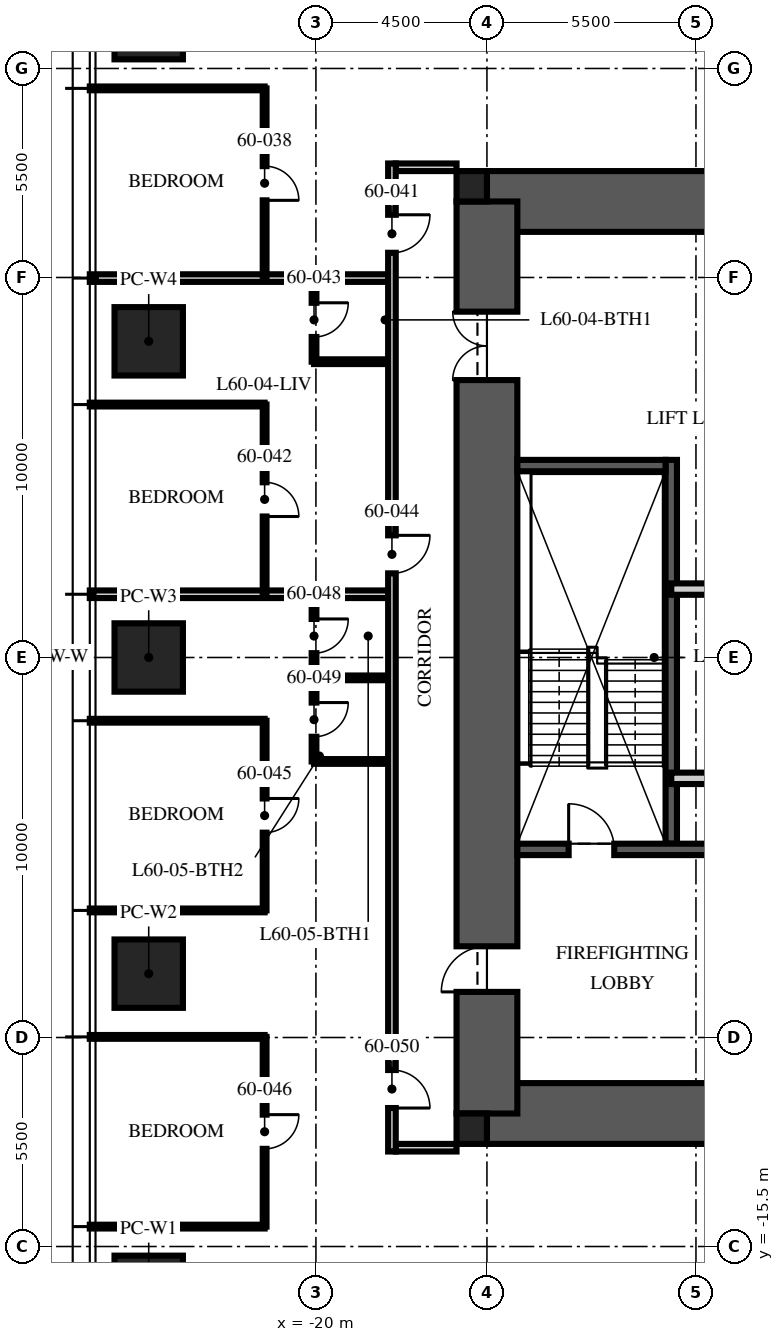
"""IFC4 building model, lengths in metres.
Left out: names, types, materials, properties, quantities, classifications, styles, units other than length and angle.
Written with IfcOpenShell. Run it as: python <this file> out.ifc"""

import sys

from ifc_helpers import new_model, si_unit, direction, frame, frame_2d, origin, origin_2d, place, context, subcontext, project, spatial, rectangle, extrude, element, fill, save


model = new_model("IFC4")
c1 = context("Model", 3, precision=1e-05, world=origin(), true_north=direction((0.0, 1.0)))
c2 = subcontext(c1, "Body", "Model", "MODEL_VIEW")
j1 = project(units=[si_unit("LENGTHUNIT", "METRE"), si_unit("PLANEANGLEUNIT", "RADIAN")], contexts=[c1])
p1 = place(None, origin())
s1 = spatial("IfcSite", under=j1, at=p1, CompositionType="ELEMENT")
p2 = place(p1, origin())
s2 = spatial("IfcBuilding", under=s1, at=p2, CompositionType="ELEMENT")
p3 = place(p2, frame((0.0, 0.0, 240.75)))
s3 = spatial("IfcBuildingStorey", under=s2, at=p3, CompositionType="ELEMENT", Elevation=240.75)
for number, where, z_axis, x_axis in (
    (1, (-15.5, 12.0, -0.25), (0.0, 0.0, 1.0), (1.0, 0.0, 0.0)),
    (2, (-15.5, -12.0, -0.25), (0.0, 0.0, 1.0), (1.0, 0.0, 0.0)),
):
    element("IfcWall", number, at=place(p3, frame(where, z_axis=z_axis, x_axis=x_axis)), inside=s3, PredefinedType="SHEAR", context=c2, shape_type="SweptSolid", body=[
        extrude(rectangle(XDim=31.0, YDim=1.6, at=frame_2d((15.5, 0.0))), origin(), (0.0, 0.0, 1.0), 3.75),
    ])
p4 = place(p3, frame((-15.5, -12.0, -0.25), z_axis=(0.0, 0.0, 1.0), x_axis=(0.0, 1.0, 0.0)))
e3 = element("IfcWall", 3, at=p4, inside=s3, PredefinedType="SHEAR", context=c2, shape_type="SweptSolid", body=[
    extrude(rectangle(XDim=24.0, YDim=1.6, at=frame_2d((12.0, 0.0))), origin(), (0.0, 0.0, 1.0), 3.75),
])
p5 = place(p4, frame((3.2, 0.0, 0.25)))
e4 = element("IfcOpeningElement", 4, at=p5, cuts=e3, PredefinedType="OPENING", context=c2, shape_type="SweptSolid", body=[
    extrude(rectangle(XDim=1.2, YDim=2.1, at=frame_2d((0.6, 1.05))), frame((0.0, 0.81, 0.0), z_axis=(0.0, -1.0, 0.0), x_axis=(1.0, 0.0, 0.0)), (0.0, 0.0, 1.0), 1.62),
])
p6 = place(p4, frame((19.3, 0.0, 0.25)))
e5 = element("IfcOpeningElement", 5, at=p6, cuts=e3, PredefinedType="OPENING", context=c2, shape_type="SweptSolid", body=[
    extrude(rectangle(XDim=1.8, YDim=2.1, at=frame_2d((0.9, 1.05))), frame((0.0, 0.81, 0.0), z_axis=(0.0, -1.0, 0.0), x_axis=(1.0, 0.0, 0.0)), (0.0, 0.0, 1.0), 1.62),
])
for number, where, z_axis, x_axis in (
    (6, (-15.9, 12.4, -0.25), (0.0, 0.0, 1.0), (1.0, 0.0, 0.0)),
    (7, (-15.9, -12.4, -0.25), (0.0, 0.0, 1.0), (1.0, 0.0, 0.0)),
):
    element("IfcColumn", number, at=place(p3, frame(where, z_axis=z_axis, x_axis=x_axis)), inside=s3, PredefinedType="COLUMN", context=c2, shape_type="SweptSolid", body=[
        extrude(rectangle(XDim=0.8, YDim=0.8, at=origin_2d()), origin(), (0.0, 0.0, 1.0), 3.75),
    ])
for number, where, z_axis, x_axis in (
    (8, (-24.4, -16.64, 0.0), (0.0, 0.0, 1.0), (0.0, 1.0, 0.0)),
    (9, (-24.4, -8.32, 0.0), (0.0, 0.0, 1.0), (0.0, 1.0, 0.0)),
    (10, (-24.4, 0.0, 0.0), (0.0, 0.0, 1.0), (0.0, 1.0, 0.0)),
    (11, (-24.4, 8.32, 0.0), (0.0, 0.0, 1.0), (0.0, 1.0, 0.0)),
    (12, (-24.4, 16.64, 0.0), (0.0, 0.0, 1.0), (0.0, 1.0, 0.0)),
):
    element("IfcColumn", number, at=place(p3, frame(where, z_axis=z_axis, x_axis=x_axis)), inside=s3, PredefinedType="COLUMN", context=c2, shape_type="SweptSolid", body=[
        extrude(rectangle(XDim=1.8, YDim=1.8, at=origin_2d()), origin(), (0.0, 0.0, 1.0), 3.75),
    ])
p7 = place(p3, frame((-10.65, -4.9, 0.0), z_axis=(0.0, 0.0, 1.0), x_axis=(0.0, 1.0, 0.0)))
e13 = element("IfcWall", 13, at=p7, inside=s3, PredefinedType="SOLIDWALL", context=c2, shape_type="SweptSolid", body=[
    extrude(rectangle(XDim=10.1, YDim=0.3, at=frame_2d((5.05, 0.0))), origin(), (0.0, 0.0, 1.0), 3.5),
])
p8 = place(p3, frame((-14.7, -5.05, 0.0), z_axis=(0.0, 0.0, 1.0), x_axis=(1.0, 0.0, 0.0)))
e14 = element("IfcWall", 14, at=p8, inside=s3, PredefinedType="SOLIDWALL", context=c2, shape_type="SweptSolid", body=[
    extrude(rectangle(XDim=5.9, YDim=0.3, at=frame_2d((2.95, 0.0))), origin(), (0.0, 0.0, 1.0), 3.5),
])
p9 = place(p8, frame((1.35, 0.0, 0.0)))
e15 = element("IfcOpeningElement", 15, at=p9, cuts=e14, PredefinedType="OPENING", context=c2, shape_type="SweptSolid", body=[
    extrude(rectangle(XDim=1.2, YDim=2.1, at=frame_2d((0.6, 1.05))), frame((0.0, 0.16, 0.0), z_axis=(0.0, -1.0, 0.0), x_axis=(1.0, 0.0, 0.0)), (0.0, 0.0, 1.0), 0.32),
])
p10 = place(p3, frame((-14.7, 5.05, 0.0), z_axis=(0.0, 0.0, 1.0), x_axis=(1.0, 0.0, 0.0)))
e16 = element("IfcWall", 16, at=p10, inside=s3, PredefinedType="SOLIDWALL", context=c2, shape_type="SweptSolid", body=[
    extrude(rectangle(XDim=3.9, YDim=0.3, at=frame_2d((1.95, 0.0))), origin(), (0.0, 0.0, 1.0), 3.5),
])
p11 = place(p3, frame((-10.65, 1.8, 0.0), z_axis=(0.0, 0.0, 1.0), x_axis=(1.0, 0.0, 0.0)))
e17 = element("IfcWall", 17, at=p11, inside=s3, PredefinedType="PARTITIONING", context=c2, shape_type="SweptSolid", body=[
    extrude(rectangle(XDim=21.3, YDim=0.3, at=frame_2d((10.65, 0.0))), origin(), (0.0, 0.0, 1.0), 3.5),
])
p12 = place(p11, frame((10.05, 0.0, 0.0)))
e18 = element("IfcOpeningElement", 18, at=p12, cuts=e17, PredefinedType="OPENING", context=c2, shape_type="SweptSolid", body=[
    extrude(rectangle(XDim=1.2, YDim=2.1, at=frame_2d((0.6, 1.05))), frame((0.0, 0.16, 0.0), z_axis=(0.0, -1.0, 0.0), x_axis=(1.0, 0.0, 0.0)), (0.0, 0.0, 1.0), 0.32),
])
p13 = place(p11, frame((19.238, 0.0, 0.0)))
e19 = element("IfcOpeningElement", 19, at=p13, cuts=e17, PredefinedType="OPENING", context=c2, shape_type="SweptSolid", body=[
    extrude(rectangle(XDim=0.9, YDim=2.1, at=frame_2d((0.45, 1.05))), frame((0.0, 0.16, 0.0), z_axis=(0.0, -1.0, 0.0), x_axis=(1.0, 0.0, 0.0)), (0.0, 0.0, 1.0), 0.32),
])
p14 = place(p3, frame((-10.65, -3.18, 0.0), z_axis=(0.0, 0.0, 1.0), x_axis=(1.0, 0.0, 0.0)))
e20 = element("IfcWall", 20, at=p14, inside=s3, PredefinedType="PARTITIONING", context=c2, shape_type="SweptSolid", body=[
    extrude(rectangle(XDim=6.45, YDim=0.3, at=frame_2d((3.225, 0.0))), origin(), (0.0, 0.0, 1.0), 3.5),
])
for number, where, z_axis, x_axis in (
    (21, (-16.3, 12.9, 0.0), (0.0, 0.0, 1.0), (-1.0, 0.0, 0.0)),
    (22, (-16.3, -12.9, 0.0), (0.0, 0.0, 1.0), (-1.0, 0.0, 0.0)),
):
    element("IfcWall", number, at=place(p3, frame(where, z_axis=z_axis, x_axis=x_axis)), inside=s3, PredefinedType="PARTITIONING", context=c2, shape_type="SweptSolid", body=[
        extrude(rectangle(XDim=1.6, YDim=0.2, at=frame_2d((0.8, 0.0))), origin(), (0.0, 0.0, 1.0), 2.3),
    ])
p15 = place(p3, frame((-21.35, 14.976, 0.0), z_axis=(0.0, 0.0, 1.0), x_axis=(-1.0, 0.0, 0.0)))
e23 = element("IfcWall", 23, at=p15, inside=s3, PredefinedType="PARTITIONING", context=c2, shape_type="SweptSolid", body=[
    extrude(rectangle(XDim=4.6, YDim=0.1, at=frame_2d((2.3, 0.0))), origin(), (0.0, 0.0, 1.0), 2.91),
])
p16 = place(p3, frame((-18.1, 9.984, 0.0), z_axis=(0.0, 0.0, 1.0), x_axis=(-1.0, 0.0, 0.0)))
e24 = element("IfcWall", 24, at=p16, inside=s3, PredefinedType="PARTITIONING", context=c2, shape_type="SweptSolid", body=[
    extrude(rectangle(XDim=7.85, YDim=0.2, at=frame_2d((3.925, 0.0))), origin(), (0.0, 0.0, 1.0), 2.91),
])
p17 = place(p3, frame((-21.35, 6.656, 0.0), z_axis=(0.0, 0.0, 1.0), x_axis=(-1.0, 0.0, 0.0)))
e25 = element("IfcWall", 25, at=p17, inside=s3, PredefinedType="PARTITIONING", context=c2, shape_type="SweptSolid", body=[
    extrude(rectangle(XDim=4.6, YDim=0.1, at=frame_2d((2.3, 0.0))), origin(), (0.0, 0.0, 1.0), 2.91),
])
p18 = place(p3, frame((-18.1, 1.664, 0.0), z_axis=(0.0, 0.0, 1.0), x_axis=(-1.0, 0.0, 0.0)))
e26 = element("IfcWall", 26, at=p18, inside=s3, PredefinedType="PARTITIONING", context=c2, shape_type="SweptSolid", body=[
    extrude(rectangle(XDim=7.85, YDim=0.2, at=frame_2d((3.925, 0.0))), origin(), (0.0, 0.0, 1.0), 2.91),
])
for number, where, z_axis, x_axis in (
    (27, (-21.35, -1.664, 0.0), (0.0, 0.0, 1.0), (-1.0, 0.0, 0.0)),
    (28, (-21.35, -6.656, 0.0), (0.0, 0.0, 1.0), (-1.0, 0.0, 0.0)),
    (29, (-21.35, -9.984, 0.0), (0.0, 0.0, 1.0), (-1.0, 0.0, 0.0)),
    (30, (-21.35, -14.976, 0.0), (0.0, 0.0, 1.0), (-1.0, 0.0, 0.0)),
):
    element("IfcWall", number, at=place(p3, frame(where, z_axis=z_axis, x_axis=x_axis)), inside=s3, PredefinedType="PARTITIONING", context=c2, shape_type="SweptSolid", body=[
        extrude(rectangle(XDim=4.6, YDim=0.1, at=frame_2d((2.3, 0.0))), origin(), (0.0, 0.0, 1.0), 2.91),
    ])
p19 = place(p3, frame((-21.35, 14.976, 0.0), z_axis=(0.0, 0.0, 1.0), x_axis=(0.0, -1.0, 0.0)))
e31 = element("IfcWall", 31, at=p19, inside=s3, PredefinedType="PARTITIONING", context=c2, shape_type="SweptSolid", body=[
    extrude(rectangle(XDim=4.992, YDim=0.1, at=frame_2d((2.496, 0.0))), origin(), (0.0, 0.0, 1.0), 2.81),
])
p20 = place(p19, frame((2.046, 0.0, 0.0)))
e32 = element("IfcOpeningElement", 32, at=p20, cuts=e31, PredefinedType="OPENING", context=c2, shape_type="SweptSolid", body=[
    extrude(rectangle(XDim=0.9, YDim=2.1, at=frame_2d((0.45, 1.05))), frame((0.0, 0.06, 0.0), z_axis=(0.0, -1.0, 0.0), x_axis=(1.0, 0.0, 0.0)), (0.0, 0.0, 1.0), 0.12),
])
p21 = place(p3, frame((-21.35, 6.656, 0.0), z_axis=(0.0, 0.0, 1.0), x_axis=(0.0, -1.0, 0.0)))
e33 = element("IfcWall", 33, at=p21, inside=s3, PredefinedType="PARTITIONING", context=c2, shape_type="SweptSolid", body=[
    extrude(rectangle(XDim=4.992, YDim=0.1, at=frame_2d((2.496, 0.0))), origin(), (0.0, 0.0, 1.0), 2.81),
])
p22 = place(p21, frame((2.046, 0.0, 0.0)))
e34 = element("IfcOpeningElement", 34, at=p22, cuts=e33, PredefinedType="OPENING", context=c2, shape_type="SweptSolid", body=[
    extrude(rectangle(XDim=0.9, YDim=2.1, at=frame_2d((0.45, 1.05))), frame((0.0, 0.06, 0.0), z_axis=(0.0, -1.0, 0.0), x_axis=(1.0, 0.0, 0.0)), (0.0, 0.0, 1.0), 0.12),
])
p23 = place(p3, frame((-20.05, 9.984, 0.0), z_axis=(0.0, 0.0, 1.0), x_axis=(0.0, -1.0, 0.0)))
e35 = element("IfcWall", 35, at=p23, inside=s3, PredefinedType="PARTITIONING", context=c2, shape_type="SweptSolid", body=[
    extrude(rectangle(XDim=2.2, YDim=0.125, at=frame_2d((1.1, 0.0))), origin(), (0.0, 0.0, 1.0), 2.6),
])
p24 = place(p23, frame((0.65, 0.0, 0.0)))
e36 = element("IfcOpeningElement", 36, at=p24, cuts=e35, PredefinedType="OPENING", context=c2, shape_type="SweptSolid", body=[
    extrude(rectangle(XDim=0.9, YDim=2.1, at=frame_2d((0.45, 1.05))), frame((0.0, 0.073, 0.0), z_axis=(0.0, -1.0, 0.0), x_axis=(1.0, 0.0, 0.0)), (0.0, 0.0, 1.0), 0.145),
])
p25 = place(p3, frame((-18.1, 7.784, 0.0), z_axis=(0.0, 0.0, 1.0), x_axis=(-1.0, 0.0, 0.0)))
e37 = element("IfcWall", 37, at=p25, inside=s3, PredefinedType="PARTITIONING", context=c2, shape_type="SweptSolid", body=[
    extrude(rectangle(XDim=1.95, YDim=0.125, at=frame_2d((0.975, 0.0))), origin(), (0.0, 0.0, 1.0), 3.5),
])
p26 = place(p3, frame((-21.35, -1.664, 0.0), z_axis=(0.0, 0.0, 1.0), x_axis=(0.0, -1.0, 0.0)))
e38 = element("IfcWall", 38, at=p26, inside=s3, PredefinedType="PARTITIONING", context=c2, shape_type="SweptSolid", body=[
    extrude(rectangle(XDim=4.992, YDim=0.1, at=frame_2d((2.496, 0.0))), origin(), (0.0, 0.0, 1.0), 2.81),
])
p27 = place(p26, frame((2.046, 0.0, 0.0)))
e39 = element("IfcOpeningElement", 39, at=p27, cuts=e38, PredefinedType="OPENING", context=c2, shape_type="SweptSolid", body=[
    extrude(rectangle(XDim=0.9, YDim=2.1, at=frame_2d((0.45, 1.05))), frame((0.0, 0.06, 0.0), z_axis=(0.0, -1.0, 0.0), x_axis=(1.0, 0.0, 0.0)), (0.0, 0.0, 1.0), 0.12),
])
p28 = place(p3, frame((-21.35, -9.984, 0.0), z_axis=(0.0, 0.0, 1.0), x_axis=(0.0, -1.0, 0.0)))
e40 = element("IfcWall", 40, at=p28, inside=s3, PredefinedType="PARTITIONING", context=c2, shape_type="SweptSolid", body=[
    extrude(rectangle(XDim=4.992, YDim=0.1, at=frame_2d((2.496, 0.0))), origin(), (0.0, 0.0, 1.0), 2.81),
])
p29 = place(p28, frame((2.046, 0.0, 0.0)))
e41 = element("IfcOpeningElement", 41, at=p29, cuts=e40, PredefinedType="OPENING", context=c2, shape_type="SweptSolid", body=[
    extrude(rectangle(XDim=0.9, YDim=2.1, at=frame_2d((0.45, 1.05))), frame((0.0, 0.06, 0.0), z_axis=(0.0, -1.0, 0.0), x_axis=(1.0, 0.0, 0.0)), (0.0, 0.0, 1.0), 0.12),
])
p30 = place(p3, frame((-20.05, 1.664, 0.0), z_axis=(0.0, 0.0, 1.0), x_axis=(0.0, -1.0, 0.0)))
e42 = element("IfcWall", 42, at=p30, inside=s3, PredefinedType="PARTITIONING", context=c2, shape_type="SweptSolid", body=[
    extrude(rectangle(XDim=4.4, YDim=0.125, at=frame_2d((2.2, 0.0))), origin(), (0.0, 0.0, 1.0), 2.6),
])
p31 = place(p30, frame((0.65, 0.0, 0.0)))
e43 = element("IfcOpeningElement", 43, at=p31, cuts=e42, PredefinedType="OPENING", context=c2, shape_type="SweptSolid", body=[
    extrude(rectangle(XDim=0.9, YDim=2.1, at=frame_2d((0.45, 1.05))), frame((0.0, 0.073, 0.0), z_axis=(0.0, -1.0, 0.0), x_axis=(1.0, 0.0, 0.0)), (0.0, 0.0, 1.0), 0.145),
])
p32 = place(p30, frame((2.85, 0.0, 0.0)))
e44 = element("IfcOpeningElement", 44, at=p32, cuts=e42, PredefinedType="OPENING", context=c2, shape_type="SweptSolid", body=[
    extrude(rectangle(XDim=0.9, YDim=2.1, at=frame_2d((0.45, 1.05))), frame((0.0, 0.073, 0.0), z_axis=(0.0, -1.0, 0.0), x_axis=(1.0, 0.0, 0.0)), (0.0, 0.0, 1.0), 0.145),
])
for number, where, z_axis, x_axis in (
    (45, (-18.1, -0.536, 0.0), (0.0, 0.0, 1.0), (-1.0, 0.0, 0.0)),
    (46, (-18.1, -2.736, 0.0), (0.0, 0.0, 1.0), (-1.0, 0.0, 0.0)),
):
    element("IfcWall", number, at=place(p3, frame(where, z_axis=z_axis, x_axis=x_axis)), inside=s3, PredefinedType="PARTITIONING", context=c2, shape_type="SweptSolid", body=[
        extrude(rectangle(XDim=1.95, YDim=0.125, at=frame_2d((0.975, 0.0))), origin(), (0.0, 0.0, 1.0), 3.5),
    ])
p33 = place(p3, frame((-18.0, 13.0, 0.0), z_axis=(0.0, 0.0, 1.0), x_axis=(0.0, -1.0, 0.0)))
e47 = element("IfcWall", 47, at=p33, inside=s3, PredefinedType="PARTITIONING", context=c2, shape_type="SweptSolid", body=[
    extrude(rectangle(XDim=26.0, YDim=0.2, at=frame_2d((13.0, 0.0))), origin(), (0.0, 0.0, 1.0), 2.6),
])
p34 = place(p33, frame((1.35, 0.0, 0.0)))
e48 = element("IfcOpeningElement", 48, at=p34, cuts=e47, PredefinedType="OPENING", context=c2, shape_type="SweptSolid", body=[
    extrude(rectangle(XDim=1.0, YDim=2.2, at=frame_2d((0.5, 1.1))), frame((0.0, 0.11, 0.0), z_axis=(0.0, -1.0, 0.0), x_axis=(1.0, 0.0, 0.0)), (0.0, 0.0, 1.0), 0.22),
])
p35 = place(p33, frame((9.786, 0.0, 0.0)))
e49 = element("IfcOpeningElement", 49, at=p35, cuts=e47, PredefinedType="OPENING", context=c2, shape_type="SweptSolid", body=[
    extrude(rectangle(XDim=1.0, YDim=2.2, at=frame_2d((0.5, 1.1))), frame((0.0, 0.11, 0.0), z_axis=(0.0, -1.0, 0.0), x_axis=(1.0, 0.0, 0.0)), (0.0, 0.0, 1.0), 0.22),
])
p36 = place(p33, frame((23.856, 0.0, 0.0)))
e50 = element("IfcOpeningElement", 50, at=p36, cuts=e47, PredefinedType="OPENING", context=c2, shape_type="SweptSolid", body=[
    extrude(rectangle(XDim=1.0, YDim=2.2, at=frame_2d((0.5, 1.1))), frame((0.0, 0.11, 0.0), z_axis=(0.0, -1.0, 0.0), x_axis=(1.0, 0.0, 0.0)), (0.0, 0.0, 1.0), 0.22),
])
p37 = place(p9, origin())
e51 = element("IfcDoor", 51, at=p37, inside=s3, OperationType="SINGLE_SWING_LEFT", PredefinedType="DOOR", context=c2, shape_type="SweptSolid", body=[
    extrude(rectangle(XDim=1.2, YDim=2.1, at=frame_2d((0.6, 1.05))), frame((0.0, 0.025, 0.0), z_axis=(0.0, -1.0, 0.0), x_axis=(1.0, 0.0, 0.0)), (0.0, 0.0, 1.0), 0.05),
])
fill(e15, e51)
p38 = place(p5, origin())
e52 = element("IfcDoor", 52, at=p38, inside=s3, OperationType="SINGLE_SWING_LEFT", PredefinedType="DOOR", context=c2, shape_type="SweptSolid", body=[
    extrude(rectangle(XDim=1.2, YDim=2.1, at=frame_2d((0.6, 1.05))), frame((0.0, 0.025, 0.0), z_axis=(0.0, -1.0, 0.0), x_axis=(1.0, 0.0, 0.0)), (0.0, 0.0, 1.0), 0.05),
])
fill(e4, e52)
p39 = place(p6, origin())
e53 = element("IfcDoor", 53, at=p39, inside=s3, OperationType="DOUBLE_DOOR_SINGLE_SWING", PredefinedType="DOOR", context=c2, shape_type="SweptSolid", body=[
    extrude(rectangle(XDim=1.8, YDim=2.1, at=frame_2d((0.9, 1.05))), frame((0.0, 0.025, 0.0), z_axis=(0.0, -1.0, 0.0), x_axis=(1.0, 0.0, 0.0)), (0.0, 0.0, 1.0), 0.05),
])
fill(e5, e53)
p40 = place(p20, origin())
e54 = element("IfcDoor", 54, at=p40, inside=s3, OperationType="SINGLE_SWING_RIGHT", PredefinedType="DOOR", context=c2, shape_type="SweptSolid", body=[
    extrude(rectangle(XDim=0.9, YDim=2.1, at=frame_2d((0.45, 1.05))), frame((0.0, 0.025, 0.0), z_axis=(0.0, -1.0, 0.0), x_axis=(1.0, 0.0, 0.0)), (0.0, 0.0, 1.0), 0.05),
])
fill(e32, e54)
p41 = place(p34, origin())
e55 = element("IfcDoor", 55, at=p41, inside=s3, OperationType="SINGLE_SWING_LEFT", PredefinedType="DOOR", context=c2, shape_type="SweptSolid", body=[
    extrude(rectangle(XDim=1.0, YDim=2.2, at=frame_2d((0.5, 1.1))), frame((0.0, 0.025, 0.0), z_axis=(0.0, -1.0, 0.0), x_axis=(1.0, 0.0, 0.0)), (0.0, 0.0, 1.0), 0.05),
])
fill(e48, e55)
p42 = place(p22, origin())
e56 = element("IfcDoor", 56, at=p42, inside=s3, OperationType="SINGLE_SWING_RIGHT", PredefinedType="DOOR", context=c2, shape_type="SweptSolid", body=[
    extrude(rectangle(XDim=0.9, YDim=2.1, at=frame_2d((0.45, 1.05))), frame((0.0, 0.025, 0.0), z_axis=(0.0, -1.0, 0.0), x_axis=(1.0, 0.0, 0.0)), (0.0, 0.0, 1.0), 0.05),
])
fill(e34, e56)
p43 = place(p24, origin())
e57 = element("IfcDoor", 57, at=p43, inside=s3, OperationType="SINGLE_SWING_LEFT", PredefinedType="DOOR", context=c2, shape_type="SweptSolid", body=[
    extrude(rectangle(XDim=0.9, YDim=2.1, at=frame_2d((0.45, 1.05))), frame((0.0, 0.025, 0.0), z_axis=(0.0, -1.0, 0.0), x_axis=(1.0, 0.0, 0.0)), (0.0, 0.0, 1.0), 0.05),
])
fill(e36, e57)
p44 = place(p35, origin())
e58 = element("IfcDoor", 58, at=p44, inside=s3, OperationType="SINGLE_SWING_LEFT", PredefinedType="DOOR", context=c2, shape_type="SweptSolid", body=[
    extrude(rectangle(XDim=1.0, YDim=2.2, at=frame_2d((0.5, 1.1))), frame((0.0, 0.025, 0.0), z_axis=(0.0, -1.0, 0.0), x_axis=(1.0, 0.0, 0.0)), (0.0, 0.0, 1.0), 0.05),
])
fill(e49, e58)
p45 = place(p27, origin())
e59 = element("IfcDoor", 59, at=p45, inside=s3, OperationType="SINGLE_SWING_LEFT", PredefinedType="DOOR", context=c2, shape_type="SweptSolid", body=[
    extrude(rectangle(XDim=0.9, YDim=2.1, at=frame_2d((0.45, 1.05))), frame((0.0, 0.025, 0.0), z_axis=(0.0, -1.0, 0.0), x_axis=(1.0, 0.0, 0.0)), (0.0, 0.0, 1.0), 0.05),
])
fill(e39, e59)
p46 = place(p29, origin())
e60 = element("IfcDoor", 60, at=p46, inside=s3, OperationType="SINGLE_SWING_LEFT", PredefinedType="DOOR", context=c2, shape_type="SweptSolid", body=[
    extrude(rectangle(XDim=0.9, YDim=2.1, at=frame_2d((0.45, 1.05))), frame((0.0, 0.025, 0.0), z_axis=(0.0, -1.0, 0.0), x_axis=(1.0, 0.0, 0.0)), (0.0, 0.0, 1.0), 0.05),
])
fill(e41, e60)
p47 = place(p31, origin())
e61 = element("IfcDoor", 61, at=p47, inside=s3, OperationType="SINGLE_SWING_LEFT", PredefinedType="DOOR", context=c2, shape_type="SweptSolid", body=[
    extrude(rectangle(XDim=0.9, YDim=2.1, at=frame_2d((0.45, 1.05))), frame((0.0, 0.025, 0.0), z_axis=(0.0, -1.0, 0.0), x_axis=(1.0, 0.0, 0.0)), (0.0, 0.0, 1.0), 0.05),
])
fill(e43, e61)
p48 = place(p32, origin())
e62 = element("IfcDoor", 62, at=p48, inside=s3, OperationType="SINGLE_SWING_LEFT", PredefinedType="DOOR", context=c2, shape_type="SweptSolid", body=[
    extrude(rectangle(XDim=0.9, YDim=2.1, at=frame_2d((0.45, 1.05))), frame((0.0, 0.025, 0.0), z_axis=(0.0, -1.0, 0.0), x_axis=(1.0, 0.0, 0.0)), (0.0, 0.0, 1.0), 0.05),
])
fill(e44, e62)
p49 = place(p36, origin())
e63 = element("IfcDoor", 63, at=p49, inside=s3, OperationType="SINGLE_SWING_RIGHT", PredefinedType="DOOR", context=c2, shape_type="SweptSolid", body=[
    extrude(rectangle(XDim=1.0, YDim=2.2, at=frame_2d((0.5, 1.1))), frame((0.0, 0.025, 0.0), z_axis=(0.0, -1.0, 0.0), x_axis=(1.0, 0.0, 0.0)), (0.0, 0.0, 1.0), 0.05),
])
fill(e50, e63)
save(model, sys.argv[1])
